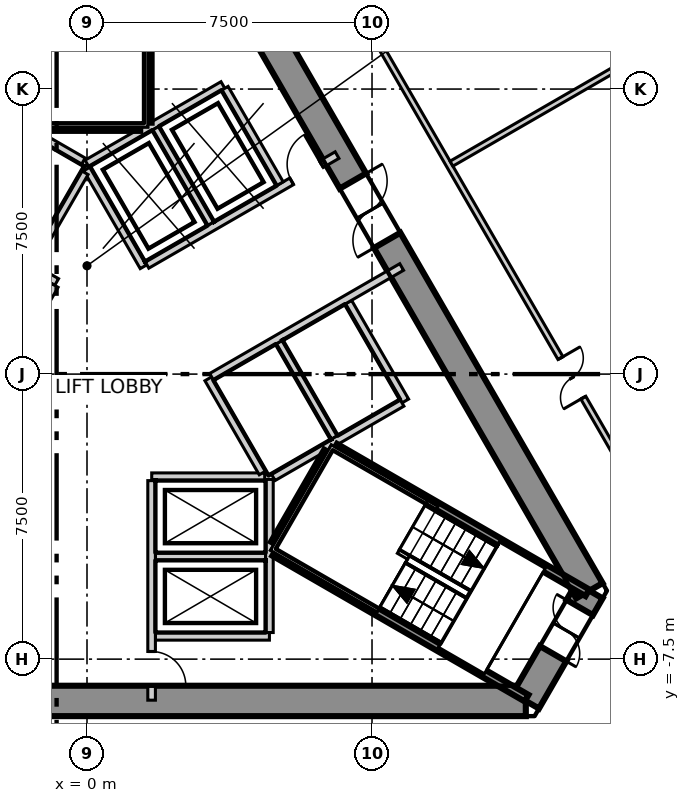
"""IFC4 building model, lengths in metres.
Left out: names, types, materials, properties, quantities, classifications, styles, units other than length and angle.
Written with IfcOpenShell. Run it as: python <this file> out.ifc"""

import sys

from ifc_helpers import new_model, si_unit, direction, frame, frame_2d, origin, place, context, subcontext, project, spatial, polyline, rectangle, outline, extrude, element, fill, save


model = new_model("IFC4")
c1 = context("Model", 3, precision=1e-05, world=origin(), true_north=direction((0.0, 1.0)))
c2 = subcontext(c1, "Body", "Model", "MODEL_VIEW")
j1 = project(units=[si_unit("LENGTHUNIT", "METRE"), si_unit("PLANEANGLEUNIT", "RADIAN")], contexts=[c1])
p1 = place(None, origin())
s1 = spatial("IfcSite", under=j1, at=p1, CompositionType="ELEMENT")
p2 = place(p1, origin())
s2 = spatial("IfcBuilding", under=s1, at=p2, CompositionType="ELEMENT")
p3 = place(p2, frame((0.0, 0.0, 176.3)))
s3 = spatial("IfcBuildingStorey", under=s2, at=p3, CompositionType="ELEMENT", Elevation=176.3)
p4 = place(p3, frame((-11.547, -8.6, -0.3), z_axis=(0.0, 0.0, 1.0), x_axis=(1.0, 0.0, 0.0)))
e1 = element("IfcWall", 1, at=p4, inside=s3, PredefinedType="SHEAR", context=c2, shape_type="SweptSolid", body=[
    extrude(outline(polyline([(-0.231, -0.4), (1.732, -0.4), (3.695, -0.4), (5.658, -0.4), (7.621, -0.4), (9.584, -0.4), (11.547, -0.4), (13.51, -0.4), (15.473, -0.4), (17.436, -0.4), (19.399, -0.4), (21.362, -0.4), (23.325, -0.4), (22.863, 0.4), (20.977, 0.4), (19.091, 0.4), (17.205, 0.4), (15.319, 0.4), (13.433, 0.4), (11.547, 0.4), (9.661, 0.4), (7.775, 0.4), (5.889, 0.4), (4.003, 0.4), (2.117, 0.4), (0.231, 0.4), (-0.231, -0.4)])), origin(), (0.0, 0.0, 1.0), 4.2),
])
p5 = place(p3, frame((11.547, -8.6, -0.3), z_axis=(0.0, 0.0, 1.0), x_axis=(0.49987182685, 0.866099391942, 0.0)))
e2 = element("IfcWall", 2, at=p5, inside=s3, PredefinedType="SHEAR", context=c2, shape_type="SweptSolid", body=[
    extrude(outline(polyline([(-0.231, -0.4), (1.674, -0.4), (3.579, -0.4), (3.118, 0.4), (1.674, 0.4), (0.231, 0.4), (-0.231, -0.4)])), origin(), (0.0, 0.0, 1.0), 4.2),
])
p6 = place(p5, frame((1.437, 0.0, 0.3)))
e3 = element("IfcOpeningElement", 3, at=p6, cuts=e2, PredefinedType="OPENING", context=c2, shape_type="SweptSolid", body=[
    extrude(rectangle(XDim=1.4, YDim=2.1, at=frame_2d((0.7, 1.05))), frame((0.0, 0.41, 0.0), z_axis=(0.0, -1.0, 0.0), x_axis=(1.0, 0.0, 0.0)), (0.0, 0.0, 1.0), 0.82),
])
p7 = place(p3, frame((13.221, -5.7, -0.3), z_axis=(0.0, 0.0, 1.0), x_axis=(-0.499995765644, 0.866027848477, 0.0)))
e4 = element("IfcWall", 4, at=p7, inside=s3, PredefinedType="SHEAR", context=c2, shape_type="SweptSolid", body=[
    extrude(outline(polyline([(-0.231, -0.4), (1.732, -0.4), (3.695, -0.4), (5.658, -0.4), (7.621, -0.4), (9.584, -0.4), (11.547, -0.4), (13.51, -0.4), (15.473, -0.4), (17.436, -0.4), (19.399, -0.4), (21.362, -0.4), (23.325, -0.4), (22.863, 0.4), (20.977, 0.4), (19.091, 0.4), (17.205, 0.4), (15.319, 0.4), (13.433, 0.4), (11.547, 0.4), (9.661, 0.4), (7.775, 0.4), (5.889, 0.4), (4.003, 0.4), (2.117, 0.4), (0.231, 0.4), (-0.231, -0.4)])), origin(), (0.0, 0.0, 1.0), 4.2),
])
p8 = place(p7, frame((10.647, 0.0, 0.3)))
e5 = element("IfcOpeningElement", 5, at=p8, cuts=e4, PredefinedType="OPENING", context=c2, shape_type="SweptSolid", body=[
    extrude(rectangle(XDim=1.8, YDim=2.1, at=frame_2d((0.9, 1.05))), frame((0.0, 0.41, 0.0), z_axis=(0.0, -1.0, 0.0), x_axis=(1.0, 0.0, 0.0)), (0.0, 0.0, 1.0), 0.82),
])
p9 = place(p3, frame((29.742, -13.793, 0.0), z_axis=(0.0, 0.0, 1.0), x_axis=(-0.499994049952, 0.866028839019, 0.0)))
e6 = element("IfcWall", 6, at=p9, inside=s3, PredefinedType="ELEMENTEDWALL", context=c2, shape_type="SweptSolid", body=[
    extrude(rectangle(XDim=53.613, YDim=0.2, at=frame_2d((26.806, 0.0))), origin(), (0.0, 0.0, 1.0), 3.9),
])
p10 = place(p9, frame((2.042, 0.0, 0.9)))
e7 = element("IfcOpeningElement", 7, at=p10, cuts=e6, PredefinedType="OPENING", context=c2, shape_type="SweptSolid", body=[
    extrude(rectangle(XDim=4.9, YDim=2.5, at=frame_2d((2.45, 1.25))), frame((0.0, 0.11, 0.0), z_axis=(0.0, -1.0, 0.0), x_axis=(1.0, 0.0, 0.0)), (0.0, 0.0, 1.0), 0.22),
])
p11 = place(p9, frame((8.42, 0.0, 0.9)))
e8 = element("IfcOpeningElement", 8, at=p11, cuts=e6, PredefinedType="OPENING", context=c2, shape_type="SweptSolid", body=[
    extrude(rectangle(XDim=4.9, YDim=2.5, at=frame_2d((2.45, 1.25))), frame((0.0, 0.11, 0.0), z_axis=(0.0, -1.0, 0.0), x_axis=(1.0, 0.0, 0.0)), (0.0, 0.0, 1.0), 0.22),
])
p12 = place(p9, frame((14.799, 0.0, 0.9)))
e9 = element("IfcOpeningElement", 9, at=p12, cuts=e6, PredefinedType="OPENING", context=c2, shape_type="SweptSolid", body=[
    extrude(rectangle(XDim=4.9, YDim=2.5, at=frame_2d((2.45, 1.25))), frame((0.0, 0.11, 0.0), z_axis=(0.0, -1.0, 0.0), x_axis=(1.0, 0.0, 0.0)), (0.0, 0.0, 1.0), 0.22),
])
p13 = place(p9, frame((21.177, 0.0, 0.9)))
e10 = element("IfcOpeningElement", 10, at=p13, cuts=e6, PredefinedType="OPENING", context=c2, shape_type="SweptSolid", body=[
    extrude(rectangle(XDim=4.9, YDim=2.5, at=frame_2d((2.45, 1.25))), frame((0.0, 0.11, 0.0), z_axis=(0.0, -1.0, 0.0), x_axis=(1.0, 0.0, 0.0)), (0.0, 0.0, 1.0), 0.22),
])
p14 = place(p9, frame((27.555, 0.0, 0.9)))
e11 = element("IfcOpeningElement", 11, at=p14, cuts=e6, PredefinedType="OPENING", context=c2, shape_type="SweptSolid", body=[
    extrude(rectangle(XDim=4.9, YDim=2.5, at=frame_2d((2.45, 1.25))), frame((0.0, 0.11, 0.0), z_axis=(0.0, -1.0, 0.0), x_axis=(1.0, 0.0, 0.0)), (0.0, 0.0, 1.0), 0.22),
])
p15 = place(p9, frame((33.934, 0.0, 0.9)))
e12 = element("IfcOpeningElement", 12, at=p15, cuts=e6, PredefinedType="OPENING", context=c2, shape_type="SweptSolid", body=[
    extrude(rectangle(XDim=4.9, YDim=2.5, at=frame_2d((2.45, 1.25))), frame((0.0, 0.11, 0.0), z_axis=(0.0, -1.0, 0.0), x_axis=(1.0, 0.0, 0.0)), (0.0, 0.0, 1.0), 0.22),
])
p16 = place(p9, frame((40.312, 0.0, 0.9)))
e13 = element("IfcOpeningElement", 13, at=p16, cuts=e6, PredefinedType="OPENING", context=c2, shape_type="SweptSolid", body=[
    extrude(rectangle(XDim=4.9, YDim=2.5, at=frame_2d((2.45, 1.25))), frame((0.0, 0.11, 0.0), z_axis=(0.0, -1.0, 0.0), x_axis=(1.0, 0.0, 0.0)), (0.0, 0.0, 1.0), 0.22),
])
p17 = place(p9, frame((46.691, 0.0, 0.9)))
e14 = element("IfcOpeningElement", 14, at=p17, cuts=e6, PredefinedType="OPENING", context=c2, shape_type="SweptSolid", body=[
    extrude(rectangle(XDim=4.9, YDim=2.5, at=frame_2d((2.45, 1.25))), frame((0.0, 0.11, 0.0), z_axis=(0.0, -1.0, 0.0), x_axis=(1.0, 0.0, 0.0)), (0.0, 0.0, 1.0), 0.22),
])
p18 = place(p3, frame((3.103, 16.625, 0.0), z_axis=(0.0, 0.0, 1.0), x_axis=(0.500016758057, -0.866015728299, 0.0)))
e15 = element("IfcWall", 15, at=p18, inside=s3, PredefinedType="PARTITIONING", context=c2, shape_type="SweptSolid", body=[
    extrude(rectangle(XDim=25.779, YDim=0.15, at=frame_2d((12.889, 0.0))), origin(), (0.0, 0.0, 1.0), 3.9),
])
p19 = place(p18, frame((18.712, 0.0, 0.0)))
e16 = element("IfcOpeningElement", 16, at=p19, cuts=e15, PredefinedType="OPENING", context=c2, shape_type="SweptSolid", body=[
    extrude(rectangle(XDim=1.2, YDim=2.1, at=frame_2d((0.6, 1.05))), frame((0.0, 0.085, 0.0), z_axis=(0.0, -1.0, 0.0), x_axis=(1.0, 0.0, 0.0)), (0.0, 0.0, 1.0), 0.17),
])
p20 = place(p18, frame((5.78, 0.0, 0.0)))
e17 = element("IfcOpeningElement", 17, at=p20, cuts=e15, PredefinedType="OPENING", context=c2, shape_type="SweptSolid", body=[
    extrude(rectangle(XDim=1.2, YDim=2.1, at=frame_2d((0.6, 1.05))), frame((0.0, 0.085, 0.0), z_axis=(0.0, -1.0, 0.0), x_axis=(1.0, 0.0, 0.0)), (0.0, 0.0, 1.0), 0.17),
])
p21 = place(p3, frame((9.591, 5.537, 0.0), z_axis=(0.0, 0.0, 1.0), x_axis=(0.86603676932, 0.499980313799, 0.0)))
e18 = element("IfcWall", 18, at=p21, inside=s3, PredefinedType="PARTITIONING", context=c2, shape_type="SweptSolid", body=[
    extrude(rectangle(XDim=7.786, YDim=0.15, at=frame_2d((3.893, 0.0))), origin(), (0.0, 0.0, 1.0), 3.4),
])
p22 = place(p3, frame((1.8, -6.9, 0.0), z_axis=(0.0, 0.0, 1.0), x_axis=(1.0, 0.0, 0.0)))
e19 = element("IfcWall", 19, at=p22, inside=s3, PredefinedType="SOLIDWALL", context=c2, shape_type="SweptSolid", body=[
    extrude(rectangle(XDim=3.0, YDim=0.2, at=frame_2d((1.5, 0.0))), origin(), (0.0, 0.0, 1.0), 3.9),
])
p23 = place(p3, frame((1.8, -4.8, 0.0), z_axis=(0.0, 0.0, 1.0), x_axis=(1.0, 0.0, 0.0)))
e20 = element("IfcWall", 20, at=p23, inside=s3, PredefinedType="SOLIDWALL", context=c2, shape_type="SweptSolid", body=[
    extrude(rectangle(XDim=2.9, YDim=0.2, at=frame_2d((1.45, 0.0))), origin(), (0.0, 0.0, 1.0), 3.9),
])
p24 = place(p3, frame((1.703, -2.7, 0.0), z_axis=(0.0, 0.0, 1.0), x_axis=(1.0, 0.0, 0.0)))
e21 = element("IfcWall", 21, at=p24, inside=s3, PredefinedType="SOLIDWALL", context=c2, shape_type="SweptSolid", body=[
    extrude(rectangle(XDim=2.973, YDim=0.2, at=frame_2d((1.487, 0.0))), origin(), (0.0, 0.0, 1.0), 3.9),
])
p25 = place(p3, frame((-0.002, 5.542, 0.0), z_axis=(0.0, 0.0, 1.0), x_axis=(0.866103910842, 0.499863997127, 0.0)))
e22 = element("IfcWall", 22, at=p25, inside=s3, PredefinedType="SOLIDWALL", context=c2, shape_type="SweptSolid", body=[
    extrude(rectangle(XDim=4.131, YDim=0.2, at=frame_2d((2.065, 0.0))), origin(), (0.0, 0.0, 1.0), 3.9),
])
p26 = place(p3, frame((0.0, 5.4, 0.0), z_axis=(0.0, 0.0, 1.0), x_axis=(0.500103862429, -0.865965430478, 0.0)))
e23 = element("IfcWall", 23, at=p26, inside=s3, PredefinedType="SOLIDWALL", context=c2, shape_type="SweptSolid", body=[
    extrude(rectangle(XDim=2.973, YDim=0.2, at=frame_2d((1.487, 0.0))), origin(), (0.0, 0.0, 1.0), 3.9),
])
p27 = place(p3, frame((3.19, -0.125, 0.0), z_axis=(0.0, 0.0, 1.0), x_axis=(0.499988658015, -0.866031951983, 0.0)))
e24 = element("IfcWall", 24, at=p27, inside=s3, PredefinedType="SOLIDWALL", context=c2, shape_type="SweptSolid", body=[
    extrude(rectangle(XDim=2.858, YDim=0.2, at=frame_2d((1.429, 0.0))), origin(), (0.0, 0.0, 1.0), 3.9),
])
p28 = place(p3, frame((1.577, 2.874, 0.0), z_axis=(0.0, 0.0, 1.0), x_axis=(0.866073694534, 0.499916348638, 0.0)))
e25 = element("IfcWall", 25, at=p28, inside=s3, PredefinedType="SOLIDWALL", context=c2, shape_type="SweptSolid", body=[
    extrude(rectangle(XDim=5.777, YDim=0.2, at=frame_2d((2.888, 0.0))), origin(), (0.0, 0.0, 1.0), 3.9),
])
p29 = place(p28, frame((4.399, 0.0, 0.0)))
e26 = element("IfcOpeningElement", 26, at=p29, cuts=e25, PredefinedType="OPENING", context=c2, shape_type="SweptSolid", body=[
    extrude(rectangle(XDim=0.9, YDim=2.1, at=frame_2d((0.45, 1.05))), frame((0.0, 0.11, 0.0), z_axis=(0.0, -1.0, 0.0), x_axis=(1.0, 0.0, 0.0)), (0.0, 0.0, 1.0), 0.22),
])
p30 = place(p3, frame((1.7, -8.58, 0.0), z_axis=(0.0, 0.0, 1.0), x_axis=(0.0, 1.0, 0.0)))
e27 = element("IfcWall", 27, at=p30, inside=s3, PredefinedType="SOLIDWALL", context=c2, shape_type="SweptSolid", body=[
    extrude(rectangle(XDim=5.777, YDim=0.2, at=frame_2d((2.889, 0.0))), origin(), (0.0, 0.0, 1.0), 3.9),
])
p31 = place(p30, frame((0.38, 0.0, 0.0)))
e28 = element("IfcOpeningElement", 28, at=p31, cuts=e27, PredefinedType="OPENING", context=c2, shape_type="SweptSolid", body=[
    extrude(rectangle(XDim=0.9, YDim=2.1, at=frame_2d((0.45, 1.05))), frame((0.0, 0.11, 0.0), z_axis=(0.0, -1.0, 0.0), x_axis=(1.0, 0.0, 0.0)), (0.0, 0.0, 1.0), 0.22),
])
p32 = place(p3, frame((4.8, -6.8, 0.0), z_axis=(0.0, 0.0, 1.0), x_axis=(0.0, 1.0, 0.0)))
e29 = element("IfcWall", 29, at=p32, inside=s3, PredefinedType="SOLIDWALL", context=c2, shape_type="SweptSolid", body=[
    extrude(rectangle(XDim=4.029, YDim=0.2, at=frame_2d((2.015, 0.0))), origin(), (0.0, 0.0, 1.0), 3.9),
])
p33 = place(p3, frame((3.626, 7.52, 0.0), z_axis=(0.0, 0.0, 1.0), x_axis=(0.500060147554, -0.865990674793, 0.0)))
e30 = element("IfcWall", 30, at=p33, inside=s3, PredefinedType="SOLIDWALL", context=c2, shape_type="SweptSolid", body=[
    extrude(rectangle(XDim=2.9, YDim=0.2, at=frame_2d((1.45, 0.0))), origin(), (0.0, 0.0, 1.0), 3.9),
])
p34 = place(p3, frame((6.876, 1.891, 0.0), z_axis=(0.0, 0.0, 1.0), x_axis=(0.499990139034, -0.866031096941, 0.0)))
e31 = element("IfcWall", 31, at=p34, inside=s3, PredefinedType="SOLIDWALL", context=c2, shape_type="SweptSolid", body=[
    extrude(rectangle(XDim=3.0, YDim=0.2, at=frame_2d((1.5, 0.0))), origin(), (0.0, 0.0, 1.0), 3.9),
])
for number, where, z_axis, x_axis in (
    (32, (1.807, 6.47, 0.0), (0.0, 0.0, 1.0), (0.5, -0.866, 0.0)),
    (33, (5.057, 0.841, 0.0), (0.0, 0.0, 1.0), (0.5, -0.866, 0.0)),
):
    element("IfcWall", number, at=place(p3, frame(where, z_axis=z_axis, x_axis=x_axis)), inside=s3, PredefinedType="SOLIDWALL", context=c2, shape_type="SweptSolid", body=[
        extrude(rectangle(XDim=2.9, YDim=0.2, at=frame_2d((1.45, 0.0))), origin(), (0.0, 0.0, 1.0), 3.9),
    ])
p35 = place(p3, frame((3.278, -0.071, 0.0), z_axis=(0.0, 0.0, 1.0), x_axis=(0.865929348003, 0.5001663366, 0.0)))
e34 = element("IfcWall", 34, at=p35, inside=s3, PredefinedType="SOLIDWALL", context=c2, shape_type="SweptSolid", body=[
    extrude(rectangle(XDim=5.776, YDim=0.2, at=frame_2d((2.888, 0.0))), origin(), (0.0, 0.0, 1.0), 3.9),
])
p36 = place(p3, frame((4.9, -2.714, 0.0), z_axis=(0.0, 0.0, 1.0), x_axis=(0.865992350556, 0.500057245502, 0.0)))
e35 = element("IfcWall", 35, at=p36, inside=s3, PredefinedType="SOLIDWALL", context=c2, shape_type="SweptSolid", body=[
    extrude(rectangle(XDim=3.914, YDim=0.2, at=frame_2d((1.957, 0.0))), origin(), (0.0, 0.0, 1.0), 3.9),
])
p37 = place(p3, frame((-1.488, 2.822, 0.0), z_axis=(0.0, 0.0, 1.0), x_axis=(0.866236612152, -0.499633997809, 0.0)))
e36 = element("IfcWall", 36, at=p37, inside=s3, PredefinedType="SOLIDWALL", context=c2, shape_type="SweptSolid", body=[
    extrude(rectangle(XDim=0.796, YDim=0.2, at=frame_2d((0.398, 0.0))), origin(), (0.0, 0.0, 1.0), 3.9),
])
p38 = place(p3, frame((-2.444, -0.433, 0.0), z_axis=(0.0, 0.0, 1.0), x_axis=(0.500035624827, 0.866004834804, 0.0)))
e37 = element("IfcWall", 37, at=p38, inside=s3, PredefinedType="SOLIDWALL", context=c2, shape_type="SweptSolid", body=[
    extrude(rectangle(XDim=3.194, YDim=0.2, at=frame_2d((1.597, 0.0))), origin(), (0.0, 0.0, 1.0), 3.9),
])
p39 = place(p3, frame((-1.67, 6.507, 0.0), z_axis=(0.0, 0.0, 1.0), x_axis=(0.865941441609, -0.500145398563, 0.0)))
e38 = element("IfcWall", 38, at=p39, inside=s3, PredefinedType="SOLIDWALL", context=c2, shape_type="SweptSolid", body=[
    extrude(rectangle(XDim=1.815, YDim=0.2, at=frame_2d((0.908, 0.0))), origin(), (0.0, 0.0, 1.0), 3.9),
])
p40 = place(p3, frame((-1.438, 2.909, 0.0), z_axis=(0.0, 0.0, 1.0), x_axis=(0.499829630636, 0.866123744241, 0.0)))
e39 = element("IfcWall", 39, at=p40, inside=s3, PredefinedType="SOLIDWALL", context=c2, shape_type="SweptSolid", body=[
    extrude(rectangle(XDim=2.761, YDim=0.2, at=frame_2d((1.38, 0.0))), origin(), (0.0, 0.0, 1.0), 3.9),
])
p41 = place(p3, frame((1.6, 6.615, 0.0), z_axis=(0.0, 0.0, 1.0), x_axis=(0.0, 1.0, 0.0)))
e40 = element("IfcWall", 40, at=p41, inside=s3, PredefinedType="SOLIDWALL", context=c2, shape_type="SweptSolid", body=[
    extrude(rectangle(XDim=7.665, YDim=0.2, at=frame_2d((3.833, 0.0))), origin(), (0.0, 0.0, 1.0), 3.9),
])
p42 = place(p3, frame((-1.4, 6.5, 0.0), z_axis=(0.0, 0.0, 1.0), x_axis=(1.0, 0.0, 0.0)))
e41 = element("IfcWall", 41, at=p42, inside=s3, PredefinedType="SOLIDWALL", context=c2, shape_type="SweptSolid", body=[
    extrude(rectangle(XDim=2.8, YDim=0.2, at=frame_2d((1.4, 0.0))), origin(), (0.0, 0.0, 1.0), 3.9),
])
p43 = place(p3, frame((4.929, -4.693, 0.0), z_axis=(0.0, 0.0, 1.0), x_axis=(0.866005769735, -0.50003400563, 0.0)))
e42 = element("IfcWall", 42, at=p43, inside=s3, PredefinedType="SOLIDWALL", context=c2, shape_type="SweptSolid", body=[
    extrude(rectangle(XDim=7.665, YDim=0.2, at=frame_2d((3.833, 0.0))), origin(), (0.0, 0.0, 1.0), 3.9),
])
p44 = place(p3, frame((4.929, -4.462, 0.0), z_axis=(0.0, 0.0, 1.0), x_axis=(0.500200581029, 0.865909567298, 0.0)))
e43 = element("IfcWall", 43, at=p44, inside=s3, PredefinedType="SOLIDWALL", context=c2, shape_type="SweptSolid", body=[
    extrude(rectangle(XDim=2.799, YDim=0.2, at=frame_2d((1.399, 0.0))), origin(), (0.0, 0.0, 1.0), 3.9),
])
p45 = place(p3, frame((6.529, -1.922, 0.0), z_axis=(0.0, 0.0, 1.0), x_axis=(0.866060938598, -0.499938446846, 0.0)))
e44 = element("IfcWall", 44, at=p45, inside=s3, PredefinedType="SOLIDWALL", context=c2, shape_type="SweptSolid", body=[
    extrude(rectangle(XDim=7.665, YDim=0.2, at=frame_2d((3.832, 0.0))), origin(), (0.0, 0.0, 1.0), 3.9),
])
p46 = place(p19, origin())
e45 = element("IfcDoor", 45, at=p46, inside=s3, OperationType="DOUBLE_DOOR_SINGLE_SWING", PredefinedType="DOOR", context=c2, shape_type="SweptSolid", body=[
    extrude(rectangle(XDim=1.2, YDim=2.1, at=frame_2d((0.6, 1.05))), frame((0.0, 0.025, 0.0), z_axis=(0.0, -1.0, 0.0), x_axis=(1.0, 0.0, 0.0)), (0.0, 0.0, 1.0), 0.05),
])
fill(e16, e45)
p47 = place(p8, origin())
e46 = element("IfcDoor", 46, at=p47, inside=s3, OperationType="DOUBLE_DOOR_SINGLE_SWING", PredefinedType="DOOR", context=c2, shape_type="SweptSolid", body=[
    extrude(rectangle(XDim=1.8, YDim=2.1, at=frame_2d((0.9, 1.05))), frame((0.0, 0.025, 0.0), z_axis=(0.0, -1.0, 0.0), x_axis=(1.0, 0.0, 0.0)), (0.0, 0.0, 1.0), 0.05),
])
fill(e5, e46)
p48 = place(p6, origin())
e47 = element("IfcDoor", 47, at=p48, inside=s3, OperationType="DOUBLE_DOOR_SINGLE_SWING", PredefinedType="DOOR", context=c2, shape_type="SweptSolid", body=[
    extrude(rectangle(XDim=1.4, YDim=2.1, at=frame_2d((0.7, 1.05))), frame((0.0, 0.025, 0.0), z_axis=(0.0, -1.0, 0.0), x_axis=(1.0, 0.0, 0.0)), (0.0, 0.0, 1.0), 0.05),
])
fill(e3, e47)
p49 = place(p29, origin())
e48 = element("IfcDoor", 48, at=p49, inside=s3, OperationType="SINGLE_SWING_LEFT", PredefinedType="DOOR", context=c2, shape_type="SweptSolid", body=[
    extrude(rectangle(XDim=0.9, YDim=2.1, at=frame_2d((0.45, 1.05))), frame((0.0, 0.025, 0.0), z_axis=(0.0, -1.0, 0.0), x_axis=(1.0, 0.0, 0.0)), (0.0, 0.0, 1.0), 0.05),
])
fill(e26, e48)
p50 = place(p31, origin())
e49 = element("IfcDoor", 49, at=p50, inside=s3, OperationType="SINGLE_SWING_LEFT", PredefinedType="DOOR", context=c2, shape_type="SweptSolid", body=[
    extrude(rectangle(XDim=0.9, YDim=2.1, at=frame_2d((0.45, 1.05))), frame((0.0, 0.025, 0.0), z_axis=(0.0, -1.0, 0.0), x_axis=(1.0, 0.0, 0.0)), (0.0, 0.0, 1.0), 0.05),
])
fill(e28, e49)
save(model, sys.argv[1])
